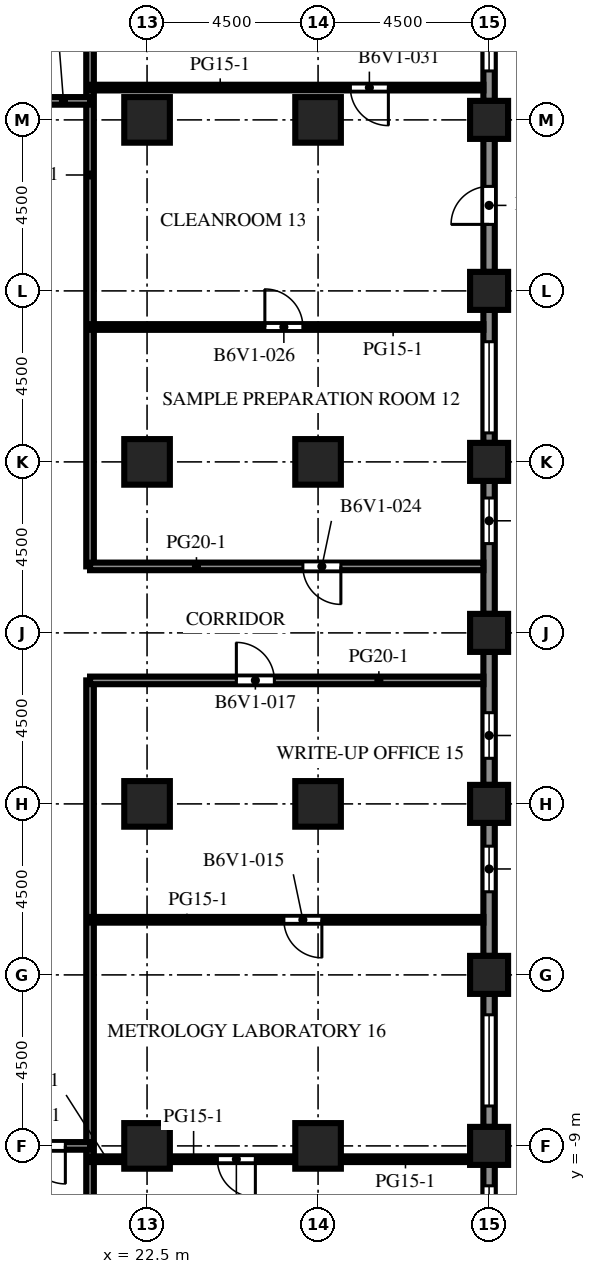
"""IFC4 building model, lengths in metres.
Left out: names, types, materials, properties, quantities, classifications, styles, units other than length and angle.
Written with IfcOpenShell. Run it as: python <this file> out.ifc"""

import sys

from ifc_helpers import new_model, si_unit, direction, frame, frame_2d, origin, origin_2d, place, context, subcontext, project, spatial, rectangle, extrude, element, fill, save


model = new_model("IFC4")
c1 = context("Model", 3, precision=1e-05, world=origin(), true_north=direction((0.0, 1.0)))
c2 = subcontext(c1, "Body", "Model", "MODEL_VIEW")
j1 = project(units=[si_unit("LENGTHUNIT", "METRE"), si_unit("PLANEANGLEUNIT", "RADIAN")], contexts=[c1])
p1 = place(None, origin())
s1 = spatial("IfcSite", under=j1, at=p1, CompositionType="ELEMENT")
p2 = place(p1, origin())
s2 = spatial("IfcBuilding", under=s1, at=p2, CompositionType="ELEMENT")
p3 = place(p2, frame((0.0, 0.0, 207.9)))
s3 = spatial("IfcBuildingStorey", under=s2, at=p3, CompositionType="ELEMENT", Elevation=207.9)
for number, where, z_axis, x_axis in (
    (1, (31.5, -9.0, 0.0), (0.0, 0.0, 1.0), (1.0, 0.0, 0.0)),
    (2, (31.5, -4.5, 0.0), (0.0, 0.0, 1.0), (1.0, 0.0, 0.0)),
    (3, (31.5, 0.0, 0.0), (0.0, 0.0, 1.0), (1.0, 0.0, 0.0)),
    (4, (31.5, 4.5, 0.0), (0.0, 0.0, 1.0), (1.0, 0.0, 0.0)),
    (5, (31.5, 9.0, 0.0), (0.0, 0.0, 1.0), (1.0, 0.0, 0.0)),
    (6, (31.5, 13.5, 0.0), (0.0, 0.0, 1.0), (1.0, 0.0, 0.0)),
    (7, (31.5, 18.0, 0.0), (0.0, 0.0, 1.0), (1.0, 0.0, 0.0)),
):
    element("IfcColumn", number, at=place(p3, frame(where, z_axis=z_axis, x_axis=x_axis)), inside=s3, PredefinedType="COLUMN", context=c2, shape_type="SweptSolid", body=[
        extrude(rectangle(XDim=1.0, YDim=1.0, at=origin_2d()), origin(), (0.0, 0.0, 1.0), 4.1),
    ])
for number, where, z_axis, x_axis in (
    (8, (22.5, -9.0, 0.0), (0.0, 0.0, 1.0), (1.0, 0.0, 0.0)),
    (9, (22.5, 0.0, 0.0), (0.0, 0.0, 1.0), (1.0, 0.0, 0.0)),
    (10, (22.5, 9.0, 0.0), (0.0, 0.0, 1.0), (1.0, 0.0, 0.0)),
    (11, (22.5, 18.0, 0.0), (0.0, 0.0, 1.0), (1.0, 0.0, 0.0)),
    (12, (27.0, -9.0, 0.0), (0.0, 0.0, 1.0), (1.0, 0.0, 0.0)),
    (13, (27.0, 0.0, 0.0), (0.0, 0.0, 1.0), (1.0, 0.0, 0.0)),
    (14, (27.0, 9.0, 0.0), (0.0, 0.0, 1.0), (1.0, 0.0, 0.0)),
    (15, (27.0, 18.0, 0.0), (0.0, 0.0, 1.0), (1.0, 0.0, 0.0)),
):
    element("IfcColumn", number, at=place(p3, frame(where, z_axis=z_axis, x_axis=x_axis)), inside=s3, PredefinedType="COLUMN", context=c2, shape_type="SweptSolid", body=[
        extrude(rectangle(XDim=1.2, YDim=1.2, at=origin_2d()), origin(), (0.0, 0.0, 1.0), 4.1),
    ])
p4 = place(p3, frame((31.5, -9.5, 0.0), z_axis=(0.0, 0.0, 1.0), x_axis=(0.0, -1.0, 0.0)))
e16 = element("IfcWall", 16, at=p4, inside=s3, PredefinedType="SOLIDWALL", context=c2, shape_type="SweptSolid", body=[
    extrude(rectangle(XDim=3.5, YDim=0.3, at=frame_2d((1.75, 0.0))), origin(), (0.0, 0.0, 1.0), 2.85),
])
p5 = place(p4, frame((0.55, 0.0, 0.8)))
e17 = element("IfcOpeningElement", 17, at=p5, cuts=e16, PredefinedType="OPENING", context=c2, shape_type="SweptSolid", body=[
    extrude(rectangle(XDim=2.4, YDim=1.7, at=frame_2d((1.2, 0.85))), frame((0.0, 0.16, 0.0), z_axis=(0.0, -1.0, 0.0), x_axis=(1.0, 0.0, 0.0)), (0.0, 0.0, 1.0), 0.32),
])
p6 = place(p3, frame((31.5, -5.0, 0.0), z_axis=(0.0, 0.0, 1.0), x_axis=(0.0, -1.0, 0.0)))
e18 = element("IfcWall", 18, at=p6, inside=s3, PredefinedType="SOLIDWALL", context=c2, shape_type="SweptSolid", body=[
    extrude(rectangle(XDim=3.5, YDim=0.3, at=frame_2d((1.75, 0.0))), origin(), (0.0, 0.0, 1.0), 2.85),
])
p7 = place(p6, frame((0.55, 0.0, 0.8)))
e19 = element("IfcOpeningElement", 19, at=p7, cuts=e18, PredefinedType="OPENING", context=c2, shape_type="SweptSolid", body=[
    extrude(rectangle(XDim=2.4, YDim=1.7, at=frame_2d((1.2, 0.85))), frame((0.0, 0.16, 0.0), z_axis=(0.0, -1.0, 0.0), x_axis=(1.0, 0.0, 0.0)), (0.0, 0.0, 1.0), 0.32),
])
p8 = place(p3, frame((31.5, -0.5, 0.0), z_axis=(0.0, 0.0, 1.0), x_axis=(0.0, -1.0, 0.0)))
e20 = element("IfcWall", 20, at=p8, inside=s3, PredefinedType="SOLIDWALL", context=c2, shape_type="SweptSolid", body=[
    extrude(rectangle(XDim=3.5, YDim=0.3, at=frame_2d((1.75, 0.0))), origin(), (0.0, 0.0, 1.0), 2.85),
])
p9 = place(p8, frame((0.613, 0.0, 0.8)))
e21 = element("IfcOpeningElement", 21, at=p9, cuts=e20, PredefinedType="OPENING", context=c2, shape_type="SweptSolid", body=[
    extrude(rectangle(XDim=1.2, YDim=1.7, at=frame_2d((0.6, 0.85))), frame((0.0, 0.16, 0.0), z_axis=(0.0, -1.0, 0.0), x_axis=(1.0, 0.0, 0.0)), (0.0, 0.0, 1.0), 0.32),
])
p10 = place(p3, frame((31.5, 4.0, 0.0), z_axis=(0.0, 0.0, 1.0), x_axis=(0.0, -1.0, 0.0)))
e22 = element("IfcWall", 22, at=p10, inside=s3, PredefinedType="SOLIDWALL", context=c2, shape_type="SweptSolid", body=[
    extrude(rectangle(XDim=3.5, YDim=0.3, at=frame_2d((1.75, 0.0))), origin(), (0.0, 0.0, 1.0), 2.85),
])
p11 = place(p10, frame((1.6, 0.0, 0.8)))
e23 = element("IfcOpeningElement", 23, at=p11, cuts=e22, PredefinedType="OPENING", context=c2, shape_type="SweptSolid", body=[
    extrude(rectangle(XDim=1.2, YDim=1.7, at=frame_2d((0.6, 0.85))), frame((0.0, 0.16, 0.0), z_axis=(0.0, -1.0, 0.0), x_axis=(1.0, 0.0, 0.0)), (0.0, 0.0, 1.0), 0.32),
])
p12 = place(p3, frame((31.5, 8.5, 0.0), z_axis=(0.0, 0.0, 1.0), x_axis=(0.0, -1.0, 0.0)))
e24 = element("IfcWall", 24, at=p12, inside=s3, PredefinedType="SOLIDWALL", context=c2, shape_type="SweptSolid", body=[
    extrude(rectangle(XDim=3.5, YDim=0.3, at=frame_2d((1.75, 0.0))), origin(), (0.0, 0.0, 1.0), 2.85),
])
p13 = place(p12, frame((0.45, 0.0, 0.8)))
e25 = element("IfcOpeningElement", 25, at=p13, cuts=e24, PredefinedType="OPENING", context=c2, shape_type="SweptSolid", body=[
    extrude(rectangle(XDim=1.2, YDim=1.7, at=frame_2d((0.6, 0.85))), frame((0.0, 0.16, 0.0), z_axis=(0.0, -1.0, 0.0), x_axis=(1.0, 0.0, 0.0)), (0.0, 0.0, 1.0), 0.32),
])
p14 = place(p3, frame((31.5, 13.0, 0.0), z_axis=(0.0, 0.0, 1.0), x_axis=(0.0, -1.0, 0.0)))
e26 = element("IfcWall", 26, at=p14, inside=s3, PredefinedType="SOLIDWALL", context=c2, shape_type="SweptSolid", body=[
    extrude(rectangle(XDim=3.5, YDim=0.3, at=frame_2d((1.75, 0.0))), origin(), (0.0, 0.0, 1.0), 2.85),
])
p15 = place(p14, frame((0.837, 0.0, 0.8)))
e27 = element("IfcOpeningElement", 27, at=p15, cuts=e26, PredefinedType="OPENING", context=c2, shape_type="SweptSolid", body=[
    extrude(rectangle(XDim=2.4, YDim=1.7, at=frame_2d((1.2, 0.85))), frame((0.0, 0.16, 0.0), z_axis=(0.0, -1.0, 0.0), x_axis=(1.0, 0.0, 0.0)), (0.0, 0.0, 1.0), 0.32),
])
p16 = place(p3, frame((31.5, 17.5, 0.0), z_axis=(0.0, 0.0, 1.0), x_axis=(0.0, -1.0, 0.0)))
e28 = element("IfcWall", 28, at=p16, inside=s3, PredefinedType="SOLIDWALL", context=c2, shape_type="SweptSolid", body=[
    extrude(rectangle(XDim=3.5, YDim=0.3, at=frame_2d((1.75, 0.0))), origin(), (0.0, 0.0, 1.0), 2.85),
])
p17 = place(p16, frame((1.25, 0.0, 0.0)))
e29 = element("IfcOpeningElement", 29, at=p17, cuts=e28, PredefinedType="OPENING", context=c2, shape_type="SweptSolid", body=[
    extrude(rectangle(XDim=1.0, YDim=2.2, at=frame_2d((0.5, 1.1))), frame((0.0, 0.16, 0.0), z_axis=(0.0, -1.0, 0.0), x_axis=(1.0, 0.0, 0.0)), (0.0, 0.0, 1.0), 0.32),
])
p18 = place(p3, frame((31.5, 22.0, 0.0), z_axis=(0.0, 0.0, 1.0), x_axis=(0.0, -1.0, 0.0)))
e30 = element("IfcWall", 30, at=p18, inside=s3, PredefinedType="SOLIDWALL", context=c2, shape_type="SweptSolid", body=[
    extrude(rectangle(XDim=3.5, YDim=0.3, at=frame_2d((1.75, 0.0))), origin(), (0.0, 0.0, 1.0), 2.85),
])
p19 = place(p18, frame((0.312, 0.0, 0.8)))
e31 = element("IfcOpeningElement", 31, at=p19, cuts=e30, PredefinedType="OPENING", context=c2, shape_type="SweptSolid", body=[
    extrude(rectangle(XDim=2.4, YDim=1.7, at=frame_2d((1.2, 0.85))), frame((0.0, 0.16, 0.0), z_axis=(0.0, -1.0, 0.0), x_axis=(1.0, 0.0, 0.0)), (0.0, 0.0, 1.0), 0.32),
])
p20 = place(p3, frame((21.0, -26.85, 0.0), z_axis=(0.0, 0.0, 1.0), x_axis=(0.0, 1.0, 0.0)))
e32 = element("IfcWall", 32, at=p20, inside=s3, PredefinedType="PARTITIONING", context=c2, shape_type="SweptSolid", body=[
    extrude(rectangle(XDim=30.1, YDim=0.2, at=frame_2d((15.05, 0.0))), origin(), (0.0, 0.0, 1.0), 3.65),
])
p21 = place(p3, frame((21.0, 6.25, 0.0), z_axis=(0.0, 0.0, 1.0), x_axis=(0.0, 1.0, 0.0)))
e33 = element("IfcWall", 33, at=p21, inside=s3, PredefinedType="PARTITIONING", context=c2, shape_type="SweptSolid", body=[
    extrude(rectangle(XDim=20.6, YDim=0.2, at=frame_2d((10.3, 0.0))), origin(), (0.0, 0.0, 1.0), 3.65),
])
p22 = place(p3, frame((21.0, -9.35, 0.0), z_axis=(0.0, 0.0, 1.0), x_axis=(1.0, 0.0, 0.0)))
e34 = element("IfcWall", 34, at=p22, inside=s3, PredefinedType="PARTITIONING", context=c2, shape_type="SweptSolid", body=[
    extrude(rectangle(XDim=0.9, YDim=0.15, at=frame_2d((0.45, 0.0))), origin(), (0.0, 0.0, 1.0), 3.65),
])
p23 = place(p3, frame((26.4, -9.35, 0.0), z_axis=(0.0, 0.0, 1.0), x_axis=(-1.0, 0.0, 0.0)))
e35 = element("IfcWall", 35, at=p23, inside=s3, PredefinedType="PARTITIONING", context=c2, shape_type="SweptSolid", body=[
    extrude(rectangle(XDim=3.3, YDim=0.15, at=frame_2d((1.65, 0.0))), origin(), (0.0, 0.0, 1.0), 3.65),
])
p24 = place(p23, frame((1.05, 0.0, 0.0)))
e36 = element("IfcOpeningElement", 36, at=p24, cuts=e35, PredefinedType="OPENING", context=c2, shape_type="SweptSolid", body=[
    extrude(rectangle(XDim=1.0, YDim=2.1, at=frame_2d((0.5, 1.05))), frame((0.0, 0.085, 0.0), z_axis=(0.0, -1.0, 0.0), x_axis=(1.0, 0.0, 0.0)), (0.0, 0.0, 1.0), 0.17),
])
p25 = place(p3, frame((27.6, -9.35, 0.0), z_axis=(0.0, 0.0, 1.0), x_axis=(1.0, 0.0, 0.0)))
e37 = element("IfcWall", 37, at=p25, inside=s3, PredefinedType="PARTITIONING", context=c2, shape_type="SweptSolid", body=[
    extrude(rectangle(XDim=3.4, YDim=0.15, at=frame_2d((1.7, 0.0))), origin(), (0.0, 0.0, 1.0), 3.65),
])
p26 = place(p3, frame((21.0, -9.0, 0.0), z_axis=(0.0, 0.0, 1.0), x_axis=(-1.0, 0.0, 0.0)))
e38 = element("IfcWall", 38, at=p26, inside=s3, PredefinedType="PARTITIONING", context=c2, shape_type="SweptSolid", body=[
    extrude(rectangle(XDim=3.0, YDim=0.2, at=frame_2d((1.5, 0.0))), origin(), (0.0, 0.0, 1.0), 3.65),
])
p27 = place(p26, frame((0.65, 0.0, 0.0)))
e39 = element("IfcOpeningElement", 39, at=p27, cuts=e38, PredefinedType="OPENING", context=c2, shape_type="SweptSolid", body=[
    extrude(rectangle(XDim=1.0, YDim=2.1, at=frame_2d((0.5, 1.05))), frame((0.0, 0.11, 0.0), z_axis=(0.0, -1.0, 0.0), x_axis=(1.0, 0.0, 0.0)), (0.0, 0.0, 1.0), 0.22),
])
p28 = place(p3, frame((31.35, -3.05, 0.0), z_axis=(0.0, 0.0, 1.0), x_axis=(-1.0, 0.0, 0.0)))
e40 = element("IfcWall", 40, at=p28, inside=s3, PredefinedType="PARTITIONING", context=c2, shape_type="SweptSolid", body=[
    extrude(rectangle(XDim=10.35, YDim=0.15, at=frame_2d((5.175, 0.0))), origin(), (0.0, 0.0, 1.0), 3.65),
])
p29 = place(p28, frame((4.25, 0.0, 0.0)))
e41 = element("IfcOpeningElement", 41, at=p29, cuts=e40, PredefinedType="OPENING", context=c2, shape_type="SweptSolid", body=[
    extrude(rectangle(XDim=1.0, YDim=2.1, at=frame_2d((0.5, 1.05))), frame((0.0, 0.085, 0.0), z_axis=(0.0, -1.0, 0.0), x_axis=(1.0, 0.0, 0.0)), (0.0, 0.0, 1.0), 0.17),
])
p30 = place(p3, frame((31.35, 3.25, 0.0), z_axis=(0.0, 0.0, 1.0), x_axis=(-1.0, 0.0, 0.0)))
e42 = element("IfcWall", 42, at=p30, inside=s3, PredefinedType="PARTITIONING", context=c2, shape_type="SweptSolid", body=[
    extrude(rectangle(XDim=10.35, YDim=0.2, at=frame_2d((5.175, 0.0))), origin(), (0.0, 0.0, 1.0), 3.65),
])
p31 = place(p30, frame((5.5, 0.0, 0.0)))
e43 = element("IfcOpeningElement", 43, at=p31, cuts=e42, PredefinedType="OPENING", context=c2, shape_type="SweptSolid", body=[
    extrude(rectangle(XDim=1.0, YDim=2.1, at=frame_2d((0.5, 1.05))), frame((0.0, 0.11, 0.0), z_axis=(0.0, -1.0, 0.0), x_axis=(1.0, 0.0, 0.0)), (0.0, 0.0, 1.0), 0.22),
])
p32 = place(p3, frame((21.0, 6.25, 0.0), z_axis=(0.0, 0.0, 1.0), x_axis=(1.0, 0.0, 0.0)))
e44 = element("IfcWall", 44, at=p32, inside=s3, PredefinedType="PARTITIONING", context=c2, shape_type="SweptSolid", body=[
    extrude(rectangle(XDim=10.35, YDim=0.2, at=frame_2d((5.175, 0.0))), origin(), (0.0, 0.0, 1.0), 3.65),
])
p33 = place(p32, frame((5.6, 0.0, 0.0)))
e45 = element("IfcOpeningElement", 45, at=p33, cuts=e44, PredefinedType="OPENING", context=c2, shape_type="SweptSolid", body=[
    extrude(rectangle(XDim=1.0, YDim=2.1, at=frame_2d((0.5, 1.05))), frame((0.0, 0.11, 0.0), z_axis=(0.0, -1.0, 0.0), x_axis=(1.0, 0.0, 0.0)), (0.0, 0.0, 1.0), 0.22),
])
p34 = place(p3, frame((21.0, 12.55, 0.0), z_axis=(0.0, 0.0, 1.0), x_axis=(1.0, 0.0, 0.0)))
e46 = element("IfcWall", 46, at=p34, inside=s3, PredefinedType="PARTITIONING", context=c2, shape_type="SweptSolid", body=[
    extrude(rectangle(XDim=10.35, YDim=0.15, at=frame_2d((5.175, 0.0))), origin(), (0.0, 0.0, 1.0), 3.65),
])
p35 = place(p34, frame((4.6, 0.0, 0.0)))
e47 = element("IfcOpeningElement", 47, at=p35, cuts=e46, PredefinedType="OPENING", context=c2, shape_type="SweptSolid", body=[
    extrude(rectangle(XDim=1.0, YDim=2.1, at=frame_2d((0.5, 1.05))), frame((0.0, 0.085, 0.0), z_axis=(0.0, -1.0, 0.0), x_axis=(1.0, 0.0, 0.0)), (0.0, 0.0, 1.0), 0.17),
])
p36 = place(p3, frame((18.0, 18.5, 0.0), z_axis=(0.0, 0.0, 1.0), x_axis=(1.0, 0.0, 0.0)))
e48 = element("IfcWall", 48, at=p36, inside=s3, PredefinedType="PARTITIONING", context=c2, shape_type="SweptSolid", body=[
    extrude(rectangle(XDim=3.0, YDim=0.2, at=frame_2d((1.5, 0.0))), origin(), (0.0, 0.0, 1.0), 3.65),
])
p37 = place(p36, frame((0.6, 0.0, 0.0)))
e49 = element("IfcOpeningElement", 49, at=p37, cuts=e48, PredefinedType="OPENING", context=c2, shape_type="SweptSolid", body=[
    extrude(rectangle(XDim=1.0, YDim=2.1, at=frame_2d((0.5, 1.05))), frame((0.0, 0.11, 0.0), z_axis=(0.0, -1.0, 0.0), x_axis=(1.0, 0.0, 0.0)), (0.0, 0.0, 1.0), 0.22),
])
p38 = place(p3, frame((21.0, 18.85, 0.0), z_axis=(0.0, 0.0, 1.0), x_axis=(1.0, 0.0, 0.0)))
e50 = element("IfcWall", 50, at=p38, inside=s3, PredefinedType="PARTITIONING", context=c2, shape_type="SweptSolid", body=[
    extrude(rectangle(XDim=10.35, YDim=0.15, at=frame_2d((5.175, 0.0))), origin(), (0.0, 0.0, 1.0), 3.65),
])
p39 = place(p38, frame((6.85, 0.0, 0.0)))
e51 = element("IfcOpeningElement", 51, at=p39, cuts=e50, PredefinedType="OPENING", context=c2, shape_type="SweptSolid", body=[
    extrude(rectangle(XDim=1.0, YDim=2.1, at=frame_2d((0.5, 1.05))), frame((0.0, 0.085, 0.0), z_axis=(0.0, -1.0, 0.0), x_axis=(1.0, 0.0, 0.0)), (0.0, 0.0, 1.0), 0.17),
])
p40 = place(p5, origin())
e52 = element("IfcWindow", 52, at=p40, inside=s3, PartitioningType="SINGLE_PANEL", PredefinedType="WINDOW", context=c2, shape_type="SweptSolid", body=[
    extrude(rectangle(XDim=2.4, YDim=1.7, at=frame_2d((1.2, 0.85))), frame((0.0, 0.03, 0.0), z_axis=(0.0, -1.0, 0.0), x_axis=(1.0, 0.0, 0.0)), (0.0, 0.0, 1.0), 0.06),
])
fill(e17, e52)
p41 = place(p7, origin())
e53 = element("IfcWindow", 53, at=p41, inside=s3, PartitioningType="SINGLE_PANEL", PredefinedType="WINDOW", context=c2, shape_type="SweptSolid", body=[
    extrude(rectangle(XDim=2.4, YDim=1.7, at=frame_2d((1.2, 0.85))), frame((0.0, 0.03, 0.0), z_axis=(0.0, -1.0, 0.0), x_axis=(1.0, 0.0, 0.0)), (0.0, 0.0, 1.0), 0.06),
])
fill(e19, e53)
p42 = place(p9, origin())
e54 = element("IfcWindow", 54, at=p42, inside=s3, PartitioningType="SINGLE_PANEL", PredefinedType="WINDOW", context=c2, shape_type="SweptSolid", body=[
    extrude(rectangle(XDim=1.2, YDim=1.7, at=frame_2d((0.6, 0.85))), frame((0.0, 0.03, 0.0), z_axis=(0.0, -1.0, 0.0), x_axis=(1.0, 0.0, 0.0)), (0.0, 0.0, 1.0), 0.06),
])
fill(e21, e54)
p43 = place(p11, origin())
e55 = element("IfcWindow", 55, at=p43, inside=s3, PartitioningType="SINGLE_PANEL", PredefinedType="WINDOW", context=c2, shape_type="SweptSolid", body=[
    extrude(rectangle(XDim=1.2, YDim=1.7, at=frame_2d((0.6, 0.85))), frame((0.0, 0.03, 0.0), z_axis=(0.0, -1.0, 0.0), x_axis=(1.0, 0.0, 0.0)), (0.0, 0.0, 1.0), 0.06),
])
fill(e23, e55)
p44 = place(p13, origin())
e56 = element("IfcWindow", 56, at=p44, inside=s3, PartitioningType="SINGLE_PANEL", PredefinedType="WINDOW", context=c2, shape_type="SweptSolid", body=[
    extrude(rectangle(XDim=1.2, YDim=1.7, at=frame_2d((0.6, 0.85))), frame((0.0, 0.03, 0.0), z_axis=(0.0, -1.0, 0.0), x_axis=(1.0, 0.0, 0.0)), (0.0, 0.0, 1.0), 0.06),
])
fill(e25, e56)
p45 = place(p15, origin())
e57 = element("IfcWindow", 57, at=p45, inside=s3, PartitioningType="SINGLE_PANEL", PredefinedType="WINDOW", context=c2, shape_type="SweptSolid", body=[
    extrude(rectangle(XDim=2.4, YDim=1.7, at=frame_2d((1.2, 0.85))), frame((0.0, 0.03, 0.0), z_axis=(0.0, -1.0, 0.0), x_axis=(1.0, 0.0, 0.0)), (0.0, 0.0, 1.0), 0.06),
])
fill(e27, e57)
p46 = place(p17, origin())
e58 = element("IfcDoor", 58, at=p46, inside=s3, OperationType="SINGLE_SWING_RIGHT", PredefinedType="DOOR", context=c2, shape_type="SweptSolid", body=[
    extrude(rectangle(XDim=1.0, YDim=2.2, at=frame_2d((0.5, 1.1))), frame((0.0, 0.025, 0.0), z_axis=(0.0, -1.0, 0.0), x_axis=(1.0, 0.0, 0.0)), (0.0, 0.0, 1.0), 0.05),
])
fill(e29, e58)
p47 = place(p19, origin())
e59 = element("IfcWindow", 59, at=p47, inside=s3, PartitioningType="SINGLE_PANEL", PredefinedType="WINDOW", context=c2, shape_type="SweptSolid", body=[
    extrude(rectangle(XDim=2.4, YDim=1.7, at=frame_2d((1.2, 0.85))), frame((0.0, 0.03, 0.0), z_axis=(0.0, -1.0, 0.0), x_axis=(1.0, 0.0, 0.0)), (0.0, 0.0, 1.0), 0.06),
])
fill(e31, e59)
p48 = place(p24, origin())
e60 = element("IfcDoor", 60, at=p48, inside=s3, OperationType="SINGLE_SWING_LEFT", PredefinedType="DOOR", context=c2, shape_type="SweptSolid", body=[
    extrude(rectangle(XDim=1.0, YDim=2.1, at=frame_2d((0.5, 1.05))), frame((0.0, 0.025, 0.0), z_axis=(0.0, -1.0, 0.0), x_axis=(1.0, 0.0, 0.0)), (0.0, 0.0, 1.0), 0.05),
])
fill(e36, e60)
p49 = place(p27, origin())
e61 = element("IfcDoor", 61, at=p49, inside=s3, OperationType="SINGLE_SWING_LEFT", PredefinedType="DOOR", context=c2, shape_type="SweptSolid", body=[
    extrude(rectangle(XDim=1.0, YDim=2.1, at=frame_2d((0.5, 1.05))), frame((0.0, 0.025, 0.0), z_axis=(0.0, -1.0, 0.0), x_axis=(1.0, 0.0, 0.0)), (0.0, 0.0, 1.0), 0.05),
])
fill(e39, e61)
p50 = place(p29, origin())
e62 = element("IfcDoor", 62, at=p50, inside=s3, OperationType="SINGLE_SWING_LEFT", PredefinedType="DOOR", context=c2, shape_type="SweptSolid", body=[
    extrude(rectangle(XDim=1.0, YDim=2.1, at=frame_2d((0.5, 1.05))), frame((0.0, 0.025, 0.0), z_axis=(0.0, -1.0, 0.0), x_axis=(1.0, 0.0, 0.0)), (0.0, 0.0, 1.0), 0.05),
])
fill(e41, e62)
p51 = place(p31, origin())
e63 = element("IfcDoor", 63, at=p51, inside=s3, OperationType="SINGLE_SWING_RIGHT", PredefinedType="DOOR", context=c2, shape_type="SweptSolid", body=[
    extrude(rectangle(XDim=1.0, YDim=2.1, at=frame_2d((0.5, 1.05))), frame((0.0, 0.025, 0.0), z_axis=(0.0, -1.0, 0.0), x_axis=(1.0, 0.0, 0.0)), (0.0, 0.0, 1.0), 0.05),
])
fill(e43, e63)
p52 = place(p33, origin())
e64 = element("IfcDoor", 64, at=p52, inside=s3, OperationType="SINGLE_SWING_RIGHT", PredefinedType="DOOR", context=c2, shape_type="SweptSolid", body=[
    extrude(rectangle(XDim=1.0, YDim=2.1, at=frame_2d((0.5, 1.05))), frame((0.0, 0.025, 0.0), z_axis=(0.0, -1.0, 0.0), x_axis=(1.0, 0.0, 0.0)), (0.0, 0.0, 1.0), 0.05),
])
fill(e45, e64)
p53 = place(p35, origin())
e65 = element("IfcDoor", 65, at=p53, inside=s3, OperationType="SINGLE_SWING_LEFT", PredefinedType="DOOR", context=c2, shape_type="SweptSolid", body=[
    extrude(rectangle(XDim=1.0, YDim=2.1, at=frame_2d((0.5, 1.05))), frame((0.0, 0.025, 0.0), z_axis=(0.0, -1.0, 0.0), x_axis=(1.0, 0.0, 0.0)), (0.0, 0.0, 1.0), 0.05),
])
fill(e47, e65)
p54 = place(p39, origin())
e66 = element("IfcDoor", 66, at=p54, inside=s3, OperationType="SINGLE_SWING_RIGHT", PredefinedType="DOOR", context=c2, shape_type="SweptSolid", body=[
    extrude(rectangle(XDim=1.0, YDim=2.1, at=frame_2d((0.5, 1.05))), frame((0.0, 0.025, 0.0), z_axis=(0.0, -1.0, 0.0), x_axis=(1.0, 0.0, 0.0)), (0.0, 0.0, 1.0), 0.05),
])
fill(e51, e66)
save(model, sys.argv[1])
